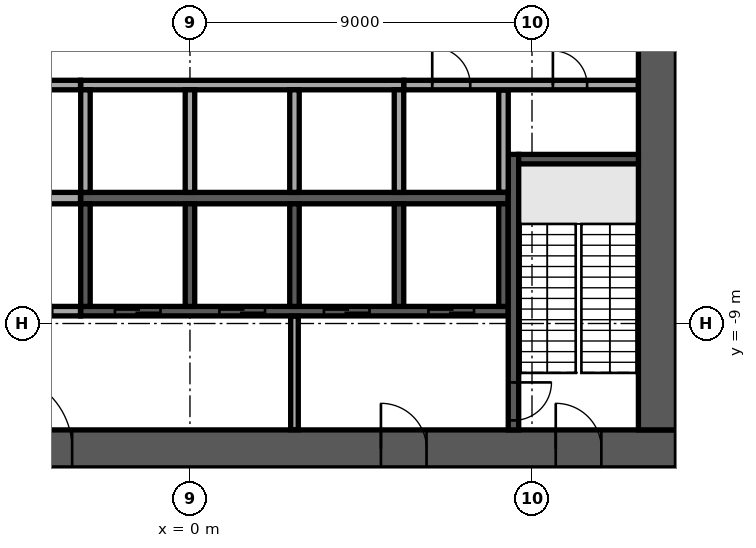
"""IFC4 building model, lengths in metres.
Left out: names, types, materials, properties, quantities, classifications, styles, units other than length and angle.
Written with IfcOpenShell. Run it as: python <this file> out.ifc"""

import sys

from ifc_helpers import new_model, si_unit, direction, frame, frame_2d, origin, place, context, subcontext, project, spatial, rectangle, extrude, element, fill, save


model = new_model("IFC4")
c1 = context("Model", 3, precision=1e-05, world=origin(), true_north=direction((0.0, 1.0)))
c2 = subcontext(c1, "Body", "Model", "MODEL_VIEW")
j1 = project(units=[si_unit("LENGTHUNIT", "METRE"), si_unit("PLANEANGLEUNIT", "RADIAN")], contexts=[c1])
p1 = place(None, origin())
s1 = spatial("IfcSite", under=j1, at=p1, CompositionType="ELEMENT")
p2 = place(p1, origin())
s2 = spatial("IfcBuilding", under=s1, at=p2, CompositionType="ELEMENT")
p3 = place(p2, frame((0.0, 0.0, 183.7)))
s3 = spatial("IfcBuildingStorey", under=s2, at=p3, CompositionType="ELEMENT", Elevation=183.7)
p4 = place(p3, frame((-12.8, -12.3, 0.0), z_axis=(0.0, 0.0, 1.0), x_axis=(1.0, 0.0, 0.0)))
e1 = element("IfcWall", 1, at=p4, inside=s3, PredefinedType="SHEAR", context=c2, shape_type="SweptSolid", body=[
    extrude(rectangle(XDim=25.6, YDim=1.0, at=frame_2d((12.8, 0.0))), origin(), (0.0, 0.0, 1.0), 5.22),
])
p5 = place(p4, frame((7.7, 0.0, 0.0)))
e2 = element("IfcOpeningElement", 2, at=p5, cuts=e1, PredefinedType="OPENING", context=c2, shape_type="SweptSolid", body=[
    extrude(rectangle(XDim=2.0, YDim=2.1, at=frame_2d((1.0, 1.05))), frame((0.0, 0.51, 0.0), z_axis=(0.0, -1.0, 0.0), x_axis=(1.0, 0.0, 0.0)), (0.0, 0.0, 1.0), 1.02),
])
p6 = place(p4, frame((17.825, 0.0, 0.0)))
e3 = element("IfcOpeningElement", 3, at=p6, cuts=e1, PredefinedType="OPENING", context=c2, shape_type="SweptSolid", body=[
    extrude(rectangle(XDim=1.2, YDim=2.1, at=frame_2d((0.6, 1.05))), frame((0.0, 0.51, 0.0), z_axis=(0.0, -1.0, 0.0), x_axis=(1.0, 0.0, 0.0)), (0.0, 0.0, 1.0), 1.02),
])
p7 = place(p4, frame((1.975, 0.0, 0.0)))
e4 = element("IfcOpeningElement", 4, at=p7, cuts=e1, PredefinedType="OPENING", context=c2, shape_type="SweptSolid", body=[
    extrude(rectangle(XDim=1.2, YDim=2.1, at=frame_2d((0.6, 1.05))), frame((0.0, 0.51, 0.0), z_axis=(0.0, -1.0, 0.0), x_axis=(1.0, 0.0, 0.0)), (0.0, 0.0, 1.0), 1.02),
])
p8 = place(p4, frame((22.425, 0.0, 0.0)))
e5 = element("IfcOpeningElement", 5, at=p8, cuts=e1, PredefinedType="OPENING", context=c2, shape_type="SweptSolid", body=[
    extrude(rectangle(XDim=1.2, YDim=2.1, at=frame_2d((0.6, 1.05))), frame((0.0, 0.51, 0.0), z_axis=(0.0, -1.0, 0.0), x_axis=(1.0, 0.0, 0.0)), (0.0, 0.0, 1.0), 1.02),
])
p9 = place(p3, frame((12.3, -11.8, 0.0), z_axis=(0.0, 0.0, 1.0), x_axis=(0.0, 1.0, 0.0)))
e6 = element("IfcWall", 6, at=p9, inside=s3, PredefinedType="SHEAR", context=c2, shape_type="SweptSolid", body=[
    extrude(rectangle(XDim=23.6, YDim=1.0, at=frame_2d((11.8, 0.0))), origin(), (0.0, 0.0, 1.0), 5.22),
])
p10 = place(p9, frame((10.6, 0.0, 0.0)))
e7 = element("IfcOpeningElement", 7, at=p10, cuts=e6, PredefinedType="OPENING", context=c2, shape_type="SweptSolid", body=[
    extrude(rectangle(XDim=2.4, YDim=2.4, at=frame_2d((1.2, 1.2))), frame((0.0, 0.51, 0.0), z_axis=(0.0, -1.0, 0.0), x_axis=(1.0, 0.0, 0.0)), (0.0, 0.0, 1.0), 1.02),
])
p11 = place(p3, frame((-2.875, -5.7, 0.0), z_axis=(0.0, 0.0, 1.0), x_axis=(1.0, 0.0, 0.0)))
e8 = element("IfcWall", 8, at=p11, inside=s3, PredefinedType="SOLIDWALL", context=c2, shape_type="SweptSolid", body=[
    extrude(rectangle(XDim=11.25, YDim=0.3, at=frame_2d((5.625, 0.0))), origin(), (0.0, 0.0, 1.0), 5.22),
])
p12 = place(p3, frame((-2.875, -2.725, 0.0), z_axis=(0.0, 0.0, 1.0), x_axis=(1.0, 0.0, 0.0)))
e9 = element("IfcWall", 9, at=p12, inside=s3, PredefinedType="SOLIDWALL", context=c2, shape_type="SweptSolid", body=[
    extrude(rectangle(XDim=8.5, YDim=0.25, at=frame_2d((4.25, 0.0))), origin(), (0.0, 0.0, 1.0), 5.22),
])
for number, where, z_axis, x_axis in (
    (10, (-2.75, -5.55, 0.0), (0.0, 0.0, 1.0), (0.0, 1.0, 0.0)),
    (11, (0.0, -5.55, 0.0), (0.0, 0.0, 1.0), (0.0, 1.0, 0.0)),
    (12, (2.75, -5.55, 0.0), (0.0, 0.0, 1.0), (0.0, 1.0, 0.0)),
    (13, (5.5, -5.55, 0.0), (0.0, 0.0, 1.0), (0.0, 1.0, 0.0)),
):
    element("IfcWall", number, at=place(p3, frame(where, z_axis=z_axis, x_axis=x_axis)), inside=s3, PredefinedType="SOLIDWALL", context=c2, shape_type="SweptSolid", body=[
        extrude(rectangle(XDim=2.7, YDim=0.25, at=frame_2d((1.35, 0.0))), origin(), (0.0, 0.0, 1.0), 5.22),
    ])
p13 = place(p3, frame((-2.875, -8.675, 0.0), z_axis=(0.0, 0.0, 1.0), x_axis=(1.0, 0.0, 0.0)))
e14 = element("IfcWall", 14, at=p13, inside=s3, PredefinedType="SOLIDWALL", context=c2, shape_type="SweptSolid", body=[
    extrude(rectangle(XDim=11.25, YDim=0.25, at=frame_2d((5.625, 0.0))), origin(), (0.0, 0.0, 1.0), 5.22),
])
p14 = place(p13, frame((0.9, 0.0, 0.0)))
e15 = element("IfcOpeningElement", 15, at=p14, cuts=e14, PredefinedType="OPENING", context=c2, shape_type="SweptSolid", body=[
    extrude(rectangle(XDim=1.2, YDim=2.1, at=frame_2d((0.6, 1.05))), frame((0.0, 0.135, 0.0), z_axis=(0.0, -1.0, 0.0), x_axis=(1.0, 0.0, 0.0)), (0.0, 0.0, 1.0), 0.27),
])
p15 = place(p13, frame((3.65, 0.0, 0.0)))
e16 = element("IfcOpeningElement", 16, at=p15, cuts=e14, PredefinedType="OPENING", context=c2, shape_type="SweptSolid", body=[
    extrude(rectangle(XDim=1.2, YDim=2.1, at=frame_2d((0.6, 1.05))), frame((0.0, 0.135, 0.0), z_axis=(0.0, -1.0, 0.0), x_axis=(1.0, 0.0, 0.0)), (0.0, 0.0, 1.0), 0.27),
])
p16 = place(p13, frame((6.4, 0.0, 0.0)))
e17 = element("IfcOpeningElement", 17, at=p16, cuts=e14, PredefinedType="OPENING", context=c2, shape_type="SweptSolid", body=[
    extrude(rectangle(XDim=1.2, YDim=2.1, at=frame_2d((0.6, 1.05))), frame((0.0, 0.135, 0.0), z_axis=(0.0, -1.0, 0.0), x_axis=(1.0, 0.0, 0.0)), (0.0, 0.0, 1.0), 0.27),
])
p17 = place(p13, frame((9.15, 0.0, 0.0)))
e18 = element("IfcOpeningElement", 18, at=p17, cuts=e14, PredefinedType="OPENING", context=c2, shape_type="SweptSolid", body=[
    extrude(rectangle(XDim=1.2, YDim=2.1, at=frame_2d((0.6, 1.05))), frame((0.0, 0.135, 0.0), z_axis=(0.0, -1.0, 0.0), x_axis=(1.0, 0.0, 0.0)), (0.0, 0.0, 1.0), 0.27),
])
for number, where, z_axis, x_axis in (
    (19, (-2.75, -8.55, 0.0), (0.0, 0.0, 1.0), (0.0, 1.0, 0.0)),
    (20, (0.0, -8.55, 0.0), (0.0, 0.0, 1.0), (0.0, 1.0, 0.0)),
    (21, (2.75, -8.55, 0.0), (0.0, 0.0, 1.0), (0.0, 1.0, 0.0)),
    (22, (5.5, -8.55, 0.0), (0.0, 0.0, 1.0), (0.0, 1.0, 0.0)),
    (23, (8.25, -8.55, 0.0), (0.0, 0.0, 1.0), (0.0, 1.0, 0.0)),
):
    element("IfcWall", number, at=place(p3, frame(where, z_axis=z_axis, x_axis=x_axis)), inside=s3, PredefinedType="SOLIDWALL", context=c2, shape_type="SweptSolid", body=[
        extrude(rectangle(XDim=2.7, YDim=0.25, at=frame_2d((1.35, 0.0))), origin(), (0.0, 0.0, 1.0), 5.22),
    ])
p18 = place(p3, frame((8.512, -4.55, 0.0), z_axis=(0.0, 0.0, 1.0), x_axis=(0.0, -1.0, 0.0)))
e24 = element("IfcWall", 24, at=p18, inside=s3, PredefinedType="SOLIDWALL", context=c2, shape_type="SweptSolid", body=[
    extrude(rectangle(XDim=7.25, YDim=0.275, at=frame_2d((3.625, 0.0))), origin(), (0.0, 0.0, 1.0), 5.22),
])
p19 = place(p18, frame((6.0, 0.0, 0.0)))
e25 = element("IfcOpeningElement", 25, at=p19, cuts=e24, PredefinedType="OPENING", context=c2, shape_type="SweptSolid", body=[
    extrude(rectangle(XDim=1.0, YDim=2.1, at=frame_2d((0.5, 1.05))), frame((0.0, 0.147, 0.0), z_axis=(0.0, -1.0, 0.0), x_axis=(1.0, 0.0, 0.0)), (0.0, 0.0, 1.0), 0.295),
])
p20 = place(p3, frame((8.65, -4.675, 0.0), z_axis=(0.0, 0.0, 1.0), x_axis=(1.0, 0.0, 0.0)))
e26 = element("IfcWall", 26, at=p20, inside=s3, PredefinedType="SOLIDWALL", context=c2, shape_type="SweptSolid", body=[
    extrude(rectangle(XDim=3.15, YDim=0.25, at=frame_2d((1.575, 0.0))), origin(), (0.0, 0.0, 1.0), 5.22),
])
p21 = place(p3, frame((2.75, -11.795, 0.0), z_axis=(0.0, 0.0, 1.0), x_axis=(0.0, 1.0, 0.0)))
e27 = element("IfcWall", 27, at=p21, inside=s3, PredefinedType="PARTITIONING", context=c2, shape_type="SweptSolid", body=[
    extrude(rectangle(XDim=2.99, YDim=0.2, at=frame_2d((1.495, 0.0))), origin(), (0.0, 0.0, 1.0), 5.22),
])
p22 = place(p3, frame((-8.37, -8.675, 0.0), z_axis=(0.0, 0.0, 1.0), x_axis=(1.0, 0.0, 0.0)))
e28 = element("IfcWall", 28, at=p22, inside=s3, PredefinedType="PARTITIONING", context=c2, shape_type="SweptSolid", body=[
    extrude(rectangle(XDim=5.49, YDim=0.25, at=frame_2d((2.745, 0.0))), origin(), (0.0, 0.0, 1.0), 5.22),
])
p23 = place(p22, frame((0.995, 0.0, 0.0)))
e29 = element("IfcOpeningElement", 29, at=p23, cuts=e28, PredefinedType="OPENING", context=c2, shape_type="SweptSolid", body=[
    extrude(rectangle(XDim=1.0, YDim=2.1, at=frame_2d((0.5, 1.05))), frame((0.0, 0.135, 0.0), z_axis=(0.0, -1.0, 0.0), x_axis=(1.0, 0.0, 0.0)), (0.0, 0.0, 1.0), 0.27),
])
p24 = place(p22, frame((3.745, 0.0, 0.0)))
e30 = element("IfcOpeningElement", 30, at=p24, cuts=e28, PredefinedType="OPENING", context=c2, shape_type="SweptSolid", body=[
    extrude(rectangle(XDim=1.0, YDim=2.1, at=frame_2d((0.5, 1.05))), frame((0.0, 0.135, 0.0), z_axis=(0.0, -1.0, 0.0), x_axis=(1.0, 0.0, 0.0)), (0.0, 0.0, 1.0), 0.27),
])
p25 = place(p3, frame((-8.35, -5.7, 0.0), z_axis=(0.0, 0.0, 1.0), x_axis=(1.0, 0.0, 0.0)))
e31 = element("IfcWall", 31, at=p25, inside=s3, PredefinedType="PARTITIONING", context=c2, shape_type="SweptSolid", body=[
    extrude(rectangle(XDim=5.47, YDim=0.3, at=frame_2d((2.735, 0.0))), origin(), (0.0, 0.0, 1.0), 5.22),
])
p26 = place(p3, frame((8.25, -5.545, 0.0), z_axis=(0.0, 0.0, 1.0), x_axis=(0.0, 1.0, 0.0)))
e32 = element("IfcWall", 32, at=p26, inside=s3, PredefinedType="PARTITIONING", context=c2, shape_type="SweptSolid", body=[
    extrude(rectangle(XDim=2.69, YDim=0.25, at=frame_2d((1.345, 0.0))), origin(), (0.0, 0.0, 1.0), 5.22),
])
p27 = place(p3, frame((-11.795, -2.725, 0.0), z_axis=(0.0, 0.0, 1.0), x_axis=(1.0, 0.0, 0.0)))
e33 = element("IfcWall", 33, at=p27, inside=s3, PredefinedType="PARTITIONING", context=c2, shape_type="SweptSolid", body=[
    extrude(rectangle(XDim=8.915, YDim=0.25, at=frame_2d((4.458, 0.0))), origin(), (0.0, 0.0, 1.0), 5.22),
])
p28 = place(p27, frame((1.295, 0.0, 0.0)))
e34 = element("IfcOpeningElement", 34, at=p28, cuts=e33, PredefinedType="OPENING", context=c2, shape_type="SweptSolid", body=[
    extrude(rectangle(XDim=1.0, YDim=2.1, at=frame_2d((0.5, 1.05))), frame((0.0, 0.135, 0.0), z_axis=(0.0, -1.0, 0.0), x_axis=(1.0, 0.0, 0.0)), (0.0, 0.0, 1.0), 0.27),
])
p29 = place(p27, frame((4.42, 0.0, 0.0)))
e35 = element("IfcOpeningElement", 35, at=p29, cuts=e33, PredefinedType="OPENING", context=c2, shape_type="SweptSolid", body=[
    extrude(rectangle(XDim=1.0, YDim=2.1, at=frame_2d((0.5, 1.05))), frame((0.0, 0.135, 0.0), z_axis=(0.0, -1.0, 0.0), x_axis=(1.0, 0.0, 0.0)), (0.0, 0.0, 1.0), 0.27),
])
p30 = place(p3, frame((5.63, -2.725, 0.0), z_axis=(0.0, 0.0, 1.0), x_axis=(1.0, 0.0, 0.0)))
e36 = element("IfcWall", 36, at=p30, inside=s3, PredefinedType="PARTITIONING", context=c2, shape_type="SweptSolid", body=[
    extrude(rectangle(XDim=6.165, YDim=0.25, at=frame_2d((3.083, 0.0))), origin(), (0.0, 0.0, 1.0), 5.22),
])
p31 = place(p30, frame((0.745, 0.0, 0.0)))
e37 = element("IfcOpeningElement", 37, at=p31, cuts=e36, PredefinedType="OPENING", context=c2, shape_type="SweptSolid", body=[
    extrude(rectangle(XDim=1.0, YDim=2.1, at=frame_2d((0.5, 1.05))), frame((0.0, 0.135, 0.0), z_axis=(0.0, -1.0, 0.0), x_axis=(1.0, 0.0, 0.0)), (0.0, 0.0, 1.0), 0.27),
])
p32 = place(p30, frame((3.92, 0.0, 0.0)))
e38 = element("IfcOpeningElement", 38, at=p32, cuts=e36, PredefinedType="OPENING", context=c2, shape_type="SweptSolid", body=[
    extrude(rectangle(XDim=0.9, YDim=2.1, at=frame_2d((0.45, 1.05))), frame((0.0, 0.135, 0.0), z_axis=(0.0, -1.0, 0.0), x_axis=(1.0, 0.0, 0.0)), (0.0, 0.0, 1.0), 0.27),
])
p33 = place(p3, frame((-2.907, -35.938, 0.0), z_axis=(0.0, 0.0, 1.0), x_axis=(0.777145668104, 0.629320753311, 0.0)))
e39 = element("IfcWall", 39, at=p33, inside=s3, PredefinedType="STANDARD", context=c2, shape_type="SweptSolid", body=[
    extrude(rectangle(XDim=49.751, YDim=0.6, at=frame_2d((24.876, 0.0))), origin(), (0.0, 0.0, 1.0), 5.22),
])
p34 = place(p33, frame((1.161, 0.0, 0.6)))
e40 = element("IfcOpeningElement", 40, at=p34, cuts=e39, PredefinedType="OPENING", context=c2, shape_type="SweptSolid", body=[
    extrude(rectangle(XDim=2.1, YDim=4.17, at=frame_2d((1.05, 2.085))), frame((0.0, 0.31, 0.0), z_axis=(0.0, -1.0, 0.0), x_axis=(1.0, 0.0, 0.0)), (0.0, 0.0, 1.0), 0.62),
])
p35 = place(p33, frame((5.644, 0.0, 0.6)))
e41 = element("IfcOpeningElement", 41, at=p35, cuts=e39, PredefinedType="OPENING", context=c2, shape_type="SweptSolid", body=[
    extrude(rectangle(XDim=2.1, YDim=4.17, at=frame_2d((1.05, 2.085))), frame((0.0, 0.31, 0.0), z_axis=(0.0, -1.0, 0.0), x_axis=(1.0, 0.0, 0.0)), (0.0, 0.0, 1.0), 0.62),
])
p36 = place(p33, frame((10.189, 0.0, 0.6)))
e42 = element("IfcOpeningElement", 42, at=p36, cuts=e39, PredefinedType="OPENING", context=c2, shape_type="SweptSolid", body=[
    extrude(rectangle(XDim=2.1, YDim=4.17, at=frame_2d((1.05, 2.085))), frame((0.0, 0.31, 0.0), z_axis=(0.0, -1.0, 0.0), x_axis=(1.0, 0.0, 0.0)), (0.0, 0.0, 1.0), 0.62),
])
p37 = place(p33, frame((19.28, 0.0, 0.6)))
e43 = element("IfcOpeningElement", 43, at=p37, cuts=e39, PredefinedType="OPENING", context=c2, shape_type="SweptSolid", body=[
    extrude(rectangle(XDim=2.1, YDim=4.17, at=frame_2d((1.05, 2.085))), frame((0.0, 0.31, 0.0), z_axis=(0.0, -1.0, 0.0), x_axis=(1.0, 0.0, 0.0)), (0.0, 0.0, 1.0), 0.62),
])
p38 = place(p33, frame((42.008, 0.0, 0.6)))
e44 = element("IfcOpeningElement", 44, at=p38, cuts=e39, PredefinedType="OPENING", context=c2, shape_type="SweptSolid", body=[
    extrude(rectangle(XDim=2.1, YDim=4.17, at=frame_2d((1.05, 2.085))), frame((0.0, 0.31, 0.0), z_axis=(0.0, -1.0, 0.0), x_axis=(1.0, 0.0, 0.0)), (0.0, 0.0, 1.0), 0.62),
])
p39 = place(p33, frame((46.491, 0.0, 0.6)))
e45 = element("IfcOpeningElement", 45, at=p39, cuts=e39, PredefinedType="OPENING", context=c2, shape_type="SweptSolid", body=[
    extrude(rectangle(XDim=2.1, YDim=4.17, at=frame_2d((1.05, 2.085))), frame((0.0, 0.31, 0.0), z_axis=(0.0, -1.0, 0.0), x_axis=(1.0, 0.0, 0.0)), (0.0, 0.0, 1.0), 0.62),
])
p40 = place(p5, origin())
e46 = element("IfcDoor", 46, at=p40, inside=s3, OperationType="SINGLE_SWING_LEFT", PredefinedType="DOOR", context=c2, shape_type="SweptSolid", body=[
    extrude(rectangle(XDim=2.0, YDim=2.1, at=frame_2d((1.0, 1.05))), frame((0.0, 0.025, 0.0), z_axis=(0.0, -1.0, 0.0), x_axis=(1.0, 0.0, 0.0)), (0.0, 0.0, 1.0), 0.05),
])
fill(e2, e46)
p41 = place(p6, origin())
e47 = element("IfcDoor", 47, at=p41, inside=s3, OperationType="SINGLE_SWING_LEFT", PredefinedType="DOOR", context=c2, shape_type="SweptSolid", body=[
    extrude(rectangle(XDim=1.2, YDim=2.1, at=frame_2d((0.6, 1.05))), frame((0.0, 0.025, 0.0), z_axis=(0.0, -1.0, 0.0), x_axis=(1.0, 0.0, 0.0)), (0.0, 0.0, 1.0), 0.05),
])
fill(e3, e47)
p42 = place(p8, origin())
e48 = element("IfcDoor", 48, at=p42, inside=s3, OperationType="SINGLE_SWING_LEFT", PredefinedType="DOOR", context=c2, shape_type="SweptSolid", body=[
    extrude(rectangle(XDim=1.2, YDim=2.1, at=frame_2d((0.6, 1.05))), frame((0.0, 0.025, 0.0), z_axis=(0.0, -1.0, 0.0), x_axis=(1.0, 0.0, 0.0)), (0.0, 0.0, 1.0), 0.05),
])
fill(e5, e48)
p43 = place(p14, origin())
e49 = element("IfcDoor", 49, at=p43, inside=s3, OperationType="DOUBLE_DOOR_SLIDING", PredefinedType="DOOR", context=c2, shape_type="SweptSolid", body=[
    extrude(rectangle(XDim=1.2, YDim=2.1, at=frame_2d((0.6, 1.05))), frame((0.0, 0.025, 0.0), z_axis=(0.0, -1.0, 0.0), x_axis=(1.0, 0.0, 0.0)), (0.0, 0.0, 1.0), 0.05),
])
fill(e15, e49)
p44 = place(p15, origin())
e50 = element("IfcDoor", 50, at=p44, inside=s3, OperationType="DOUBLE_DOOR_SLIDING", PredefinedType="DOOR", context=c2, shape_type="SweptSolid", body=[
    extrude(rectangle(XDim=1.2, YDim=2.1, at=frame_2d((0.6, 1.05))), frame((0.0, 0.025, 0.0), z_axis=(0.0, -1.0, 0.0), x_axis=(1.0, 0.0, 0.0)), (0.0, 0.0, 1.0), 0.05),
])
fill(e16, e50)
p45 = place(p16, origin())
e51 = element("IfcDoor", 51, at=p45, inside=s3, OperationType="DOUBLE_DOOR_SLIDING", PredefinedType="DOOR", context=c2, shape_type="SweptSolid", body=[
    extrude(rectangle(XDim=1.2, YDim=2.1, at=frame_2d((0.6, 1.05))), frame((0.0, 0.025, 0.0), z_axis=(0.0, -1.0, 0.0), x_axis=(1.0, 0.0, 0.0)), (0.0, 0.0, 1.0), 0.05),
])
fill(e17, e51)
p46 = place(p17, origin())
e52 = element("IfcDoor", 52, at=p46, inside=s3, OperationType="DOUBLE_DOOR_SLIDING", PredefinedType="DOOR", context=c2, shape_type="SweptSolid", body=[
    extrude(rectangle(XDim=1.2, YDim=2.1, at=frame_2d((0.6, 1.05))), frame((0.0, 0.025, 0.0), z_axis=(0.0, -1.0, 0.0), x_axis=(1.0, 0.0, 0.0)), (0.0, 0.0, 1.0), 0.05),
])
fill(e18, e52)
p47 = place(p19, origin())
e53 = element("IfcDoor", 53, at=p47, inside=s3, OperationType="SINGLE_SWING_LEFT", PredefinedType="DOOR", context=c2, shape_type="SweptSolid", body=[
    extrude(rectangle(XDim=1.0, YDim=2.1, at=frame_2d((0.5, 1.05))), frame((0.0, 0.025, 0.0), z_axis=(0.0, -1.0, 0.0), x_axis=(1.0, 0.0, 0.0)), (0.0, 0.0, 1.0), 0.05),
])
fill(e25, e53)
p48 = place(p31, origin())
e54 = element("IfcDoor", 54, at=p48, inside=s3, OperationType="SINGLE_SWING_RIGHT", PredefinedType="DOOR", context=c2, shape_type="SweptSolid", body=[
    extrude(rectangle(XDim=1.0, YDim=2.1, at=frame_2d((0.5, 1.05))), frame((0.0, 0.025, 0.0), z_axis=(0.0, -1.0, 0.0), x_axis=(1.0, 0.0, 0.0)), (0.0, 0.0, 1.0), 0.05),
])
fill(e37, e54)
p49 = place(p32, origin())
e55 = element("IfcDoor", 55, at=p49, inside=s3, OperationType="SINGLE_SWING_RIGHT", PredefinedType="DOOR", context=c2, shape_type="SweptSolid", body=[
    extrude(rectangle(XDim=0.9, YDim=2.1, at=frame_2d((0.45, 1.05))), frame((0.0, 0.025, 0.0), z_axis=(0.0, -1.0, 0.0), x_axis=(1.0, 0.0, 0.0)), (0.0, 0.0, 1.0), 0.05),
])
fill(e38, e55)
save(model, sys.argv[1])
